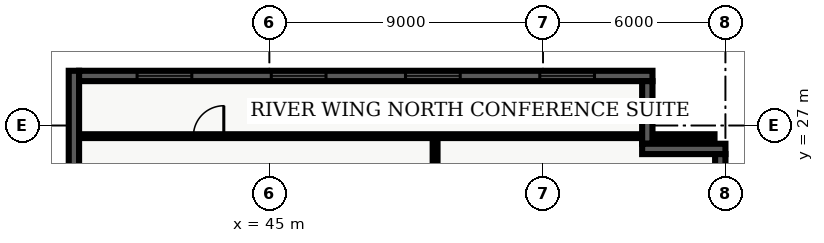
"""IFC4 building model, lengths in metres.
Left out: names, types, materials, properties, quantities, classifications, styles, units other than length and angle.
Written with IfcOpenShell. Run it as: python <this file> out.ifc"""

import sys

from ifc_helpers import new_model, entity, si_unit, converted_unit, direction, frame, origin_with_axes, origin_2d_with_axis, place, context, subcontext, project, spatial, polyline, rectangle, outline, extrude, element, fill, save


model = new_model("IFC4")
c1 = context("Model", 3, precision=1e-05, world=origin_with_axes(), true_north=direction((0.0, 1.0)))
c2 = subcontext(c1, "Body", "Model", "MODEL_VIEW")
j1 = project(units=[si_unit("LENGTHUNIT", "METRE"), converted_unit("PLANEANGLEUNIT", "DEGREE", entity("IfcPlaneAngleMeasure", 0.017), si_unit("PLANEANGLEUNIT", "RADIAN"), dimensions=[0, 0, 0, 0, 0, 0, 0])], contexts=[c1])
p1 = place(None, origin_with_axes())
s1 = spatial("IfcSite", under=j1, at=p1, CompositionType="ELEMENT")
p2 = place(p1, origin_with_axes())
s2 = spatial("IfcBuilding", under=s1, at=p2, CompositionType="ELEMENT")
p3 = place(p2, frame((0.0, 0.0, 175.8), z_axis=(0.0, 0.0, 1.0), x_axis=(1.0, 0.0, 0.0)))
s3 = spatial("IfcBuildingStorey", under=s2, at=p3, CompositionType="ELEMENT", Elevation=175.8)
p4 = place(p3, frame((50.45, 7.85, 0.0), z_axis=(0.0, 0.0, 1.0), x_axis=(0.0, 1.0, 0.0)))
e1 = element("IfcWall", 1, at=p4, inside=s3, PredefinedType="PARTITIONING", context=c2, shape_type="SweptSolid", body=[
    extrude(outline(polyline([(0.0, -0.08), (18.8, -0.08), (18.8, 0.08), (0.0, 0.08), (0.0, -0.08)])), origin_with_axes(), (0.0, 0.0, 1.0), 2.7),
])
p5 = place(p4, frame((5.823, 0.0, 0.0), z_axis=(0.0, 0.0, 1.0), x_axis=(1.0, 0.0, 0.0)))
e2 = element("IfcOpeningElement", 2, at=p5, cuts=e1, PredefinedType="OPENING", context=c2, shape_type="SweptSolid", body=[
    extrude(rectangle(XDim=1.0, YDim=0.18, at=origin_2d_with_axis()), origin_with_axes(), (0.0, 0.0, 1.0), 2.15),
])
p6 = place(p4, frame((11.602, 0.0, 0.0), z_axis=(0.0, 0.0, 1.0), x_axis=(1.0, 0.0, 0.0)))
e3 = element("IfcOpeningElement", 3, at=p6, cuts=e1, PredefinedType="OPENING", context=c2, shape_type="SweptSolid", body=[
    extrude(rectangle(XDim=1.0, YDim=0.18, at=origin_2d_with_axis()), origin_with_axes(), (0.0, 0.0, 1.0), 2.15),
])
p7 = place(p4, frame((14.129, 0.0, 0.0), z_axis=(0.0, 0.0, 1.0), x_axis=(1.0, 0.0, 0.0)))
e4 = element("IfcOpeningElement", 4, at=p7, cuts=e1, PredefinedType="OPENING", context=c2, shape_type="SweptSolid", body=[
    extrude(rectangle(XDim=1.0, YDim=0.18, at=origin_2d_with_axis()), origin_with_axes(), (0.0, 0.0, 1.0), 2.15),
])
p8 = place(p3, frame((38.735, 26.65, 0.0), z_axis=(0.0, 0.0, 1.0), x_axis=(1.0, 0.0, 0.0)))
e5 = element("IfcWall", 5, at=p8, inside=s3, PredefinedType="PARTITIONING", context=c2, shape_type="SweptSolid", body=[
    extrude(outline(polyline([(0.0, -0.062), (20.905, -0.062), (20.905, 0.062), (0.0, 0.062), (0.0, -0.062)])), origin_with_axes(), (0.0, 0.0, 1.0), 2.7),
])
p9 = place(p8, frame((4.265, 0.0, 0.0), z_axis=(0.0, 0.0, 1.0), x_axis=(1.0, 0.0, 0.0)))
e6 = element("IfcOpeningElement", 6, at=p9, cuts=e5, PredefinedType="OPENING", context=c2, shape_type="SweptSolid", body=[
    extrude(rectangle(XDim=1.0, YDim=0.145, at=origin_2d_with_axis()), origin_with_axes(), (0.0, 0.0, 1.0), 2.15),
])
p10 = place(p3, frame((38.57, 21.26, 0.0), z_axis=(0.0, 0.0, 1.0), x_axis=(0.0, 1.0, 0.0)))
e7 = element("IfcWall", 7, at=p10, inside=s3, PredefinedType="SOLIDWALL", context=c2, shape_type="SweptSolid", body=[
    extrude(outline(polyline([(0.0, -0.17), (7.54, -0.17), (7.54, 0.17), (0.0, 0.17), (0.0, -0.17)])), origin_with_axes(), (0.0, 0.0, 1.0), 3.66),
])
p11 = place(p3, frame((38.74, 28.63, 0.0), z_axis=(0.0, 0.0, 1.0), x_axis=(1.0, 0.0, 0.0)))
e8 = element("IfcWall", 8, at=p11, inside=s3, PredefinedType="SOLIDWALL", context=c2, shape_type="SweptSolid", body=[
    extrude(outline(polyline([(0.0, -0.17), (18.86, -0.17), (18.86, 0.17), (0.0, 0.17), (0.0, -0.17)])), origin_with_axes(), (0.0, 0.0, 1.0), 3.66),
])
p12 = place(p11, frame((2.808, 0.0, 0.45), z_axis=(0.0, 0.0, 1.0), x_axis=(1.0, 0.0, 0.0)))
e9 = element("IfcOpeningElement", 9, at=p12, cuts=e8, PredefinedType="OPENING", context=c2, shape_type="SweptSolid", body=[
    extrude(rectangle(XDim=1.8, YDim=0.36, at=origin_2d_with_axis()), origin_with_axes(), (0.0, 0.0, 1.0), 2.1),
])
p13 = place(p11, frame((7.222, 0.0, 0.45), z_axis=(0.0, 0.0, 1.0), x_axis=(1.0, 0.0, 0.0)))
e10 = element("IfcOpeningElement", 10, at=p13, cuts=e8, PredefinedType="OPENING", context=c2, shape_type="SweptSolid", body=[
    extrude(rectangle(XDim=1.8, YDim=0.36, at=origin_2d_with_axis()), origin_with_axes(), (0.0, 0.0, 1.0), 2.1),
])
p14 = place(p11, frame((11.637, 0.0, 0.45), z_axis=(0.0, 0.0, 1.0), x_axis=(1.0, 0.0, 0.0)))
e11 = element("IfcOpeningElement", 11, at=p14, cuts=e8, PredefinedType="OPENING", context=c2, shape_type="SweptSolid", body=[
    extrude(rectangle(XDim=1.8, YDim=0.36, at=origin_2d_with_axis()), origin_with_axes(), (0.0, 0.0, 1.0), 2.1),
])
p15 = place(p11, frame((16.053, 0.0, 0.45), z_axis=(0.0, 0.0, 1.0), x_axis=(1.0, 0.0, 0.0)))
e12 = element("IfcOpeningElement", 12, at=p15, cuts=e8, PredefinedType="OPENING", context=c2, shape_type="SweptSolid", body=[
    extrude(rectangle(XDim=1.8, YDim=0.36, at=origin_2d_with_axis()), origin_with_axes(), (0.0, 0.0, 1.0), 2.1),
])
p16 = place(p3, frame((57.43, 28.46, 0.0), z_axis=(0.0, 0.0, 1.0), x_axis=(0.0, -1.0, 0.0)))
e13 = element("IfcWall", 13, at=p16, inside=s3, PredefinedType="SOLIDWALL", context=c2, shape_type="SweptSolid", body=[
    extrude(outline(polyline([(0.0, -0.17), (2.06, -0.17), (2.06, 0.17), (0.0, 0.17), (0.0, -0.17)])), origin_with_axes(), (0.0, 0.0, 1.0), 3.66),
])
p17 = place(p3, frame((57.26, 26.23, 0.0), z_axis=(0.0, 0.0, 1.0), x_axis=(1.0, 0.0, 0.0)))
e14 = element("IfcWall", 14, at=p17, inside=s3, PredefinedType="SOLIDWALL", context=c2, shape_type="SweptSolid", body=[
    extrude(outline(polyline([(0.0, -0.17), (2.74, -0.17), (2.74, 0.17), (0.0, 0.17), (0.0, -0.17)])), origin_with_axes(), (0.0, 0.0, 1.0), 3.66),
])
p18 = place(p3, frame((59.83, 26.06, 0.0), z_axis=(0.0, 0.0, 1.0), x_axis=(0.0, -1.0, 0.0)))
e15 = element("IfcWall", 15, at=p18, inside=s3, PredefinedType="SOLIDWALL", context=c2, shape_type="SweptSolid", body=[
    extrude(outline(polyline([(0.0, -0.17), (23.66, -0.17), (23.66, 0.17), (0.0, 0.17), (0.0, -0.17)])), origin_with_axes(), (0.0, 0.0, 1.0), 3.66),
])
p19 = place(p18, frame((3.696, 0.0, 0.45), z_axis=(0.0, 0.0, 1.0), x_axis=(1.0, 0.0, 0.0)))
e16 = element("IfcOpeningElement", 16, at=p19, cuts=e15, PredefinedType="OPENING", context=c2, shape_type="SweptSolid", body=[
    extrude(rectangle(XDim=1.8, YDim=0.36, at=origin_2d_with_axis()), origin_with_axes(), (0.0, 0.0, 1.0), 2.1),
])
p20 = place(p18, frame((11.83, 0.0, 0.45), z_axis=(0.0, 0.0, 1.0), x_axis=(1.0, 0.0, 0.0)))
e17 = element("IfcOpeningElement", 17, at=p20, cuts=e15, PredefinedType="OPENING", context=c2, shape_type="SweptSolid", body=[
    extrude(rectangle(XDim=1.8, YDim=0.36, at=origin_2d_with_axis()), origin_with_axes(), (0.0, 0.0, 1.0), 2.1),
])
p21 = place(p18, frame((20.364, 0.0, 0.45), z_axis=(0.0, 0.0, 1.0), x_axis=(1.0, 0.0, 0.0)))
e18 = element("IfcOpeningElement", 18, at=p21, cuts=e15, PredefinedType="OPENING", context=c2, shape_type="SweptSolid", body=[
    extrude(rectangle(XDim=1.8, YDim=0.36, at=origin_2d_with_axis()), origin_with_axes(), (0.0, 0.0, 1.0), 2.1),
])
p22 = place(p8, frame((4.265, 0.0, 0.0), z_axis=(0.0, 0.0, 1.0), x_axis=(1.0, 0.0, 0.0)))
e19 = element("IfcDoor", 19, at=p22, inside=s3, OperationType="SINGLE_SWING_RIGHT", PredefinedType="DOOR", context=c2, shape_type="SweptSolid", body=[
    extrude(rectangle(XDim=1.0, YDim=0.075, at=origin_2d_with_axis()), origin_with_axes(), (0.0, 0.0, 1.0), 2.15),
])
fill(e6, e19)
p23 = place(p11, frame((2.808, 0.0, 0.45), z_axis=(0.0, 0.0, 1.0), x_axis=(1.0, 0.0, 0.0)))
e20 = element("IfcWindow", 20, at=p23, inside=s3, PredefinedType="WINDOW", context=c2, shape_type="SweptSolid", body=[
    extrude(rectangle(XDim=1.8, YDim=0.09, at=origin_2d_with_axis()), origin_with_axes(), (0.0, 0.0, 1.0), 2.1),
])
fill(e9, e20)
p24 = place(p11, frame((7.222, 0.0, 0.45), z_axis=(0.0, 0.0, 1.0), x_axis=(1.0, 0.0, 0.0)))
e21 = element("IfcWindow", 21, at=p24, inside=s3, PredefinedType="WINDOW", context=c2, shape_type="SweptSolid", body=[
    extrude(rectangle(XDim=1.8, YDim=0.09, at=origin_2d_with_axis()), origin_with_axes(), (0.0, 0.0, 1.0), 2.1),
])
fill(e10, e21)
p25 = place(p11, frame((11.637, 0.0, 0.45), z_axis=(0.0, 0.0, 1.0), x_axis=(1.0, 0.0, 0.0)))
e22 = element("IfcWindow", 22, at=p25, inside=s3, PredefinedType="WINDOW", context=c2, shape_type="SweptSolid", body=[
    extrude(rectangle(XDim=1.8, YDim=0.09, at=origin_2d_with_axis()), origin_with_axes(), (0.0, 0.0, 1.0), 2.1),
])
fill(e11, e22)
p26 = place(p11, frame((16.053, 0.0, 0.45), z_axis=(0.0, 0.0, 1.0), x_axis=(1.0, 0.0, 0.0)))
e23 = element("IfcWindow", 23, at=p26, inside=s3, PredefinedType="WINDOW", context=c2, shape_type="SweptSolid", body=[
    extrude(rectangle(XDim=1.8, YDim=0.09, at=origin_2d_with_axis()), origin_with_axes(), (0.0, 0.0, 1.0), 2.1),
])
fill(e12, e23)
save(model, sys.argv[1])
